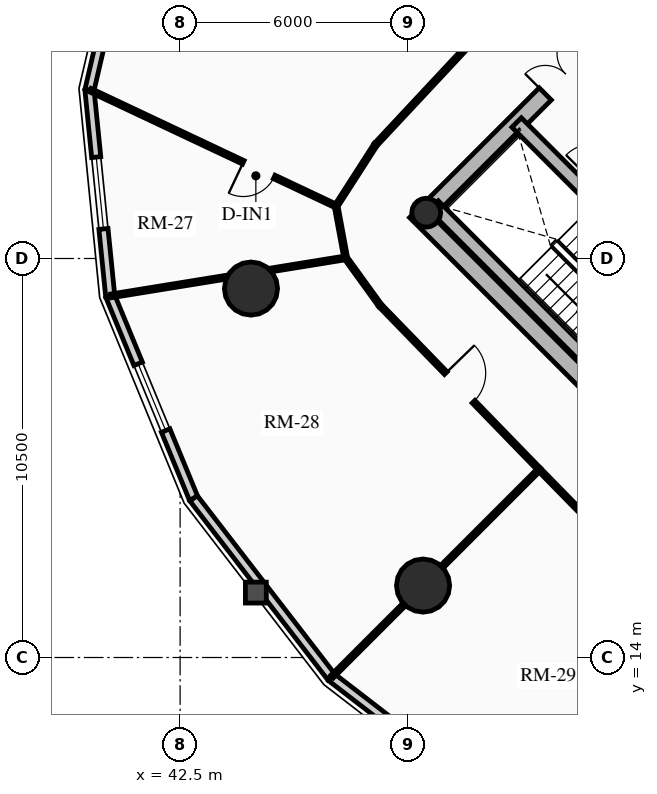
"""IFC4 building model, lengths in metres.
Left out: names, types, materials, properties, quantities, classifications, styles, units other than length and angle.
Written with IfcOpenShell. Run it as: python <this file> out.ifc"""

import sys

from ifc_helpers import new_model, si_unit, direction, frame, frame_2d, origin, origin_2d, place, context, subcontext, project, spatial, rectangle, circle, hollow_circle, extrude, source, transform, mapped, element, fill, save


model = new_model("IFC4")
c1 = context("Model", 3, precision=1e-05, world=origin(), true_north=direction((0.0, 1.0)))
c2 = subcontext(c1, "Body", "Model", "MODEL_VIEW")
j1 = project(units=[si_unit("LENGTHUNIT", "METRE"), si_unit("PLANEANGLEUNIT", "RADIAN")], contexts=[c1])
p1 = place(None, origin())
s1 = spatial("IfcSite", under=j1, at=p1, CompositionType="ELEMENT")
p2 = place(p1, origin())
s2 = spatial("IfcBuilding", under=s1, at=p2, CompositionType="ELEMENT")
p3 = place(p2, frame((0.0, 0.0, 96.34)))
s3 = spatial("IfcBuildingStorey", under=s2, at=p3, CompositionType="ELEMENT", Elevation=96.34)
p4 = place(p3, frame((58.737, 15.697, 0.0), z_axis=(0.0, 0.0, 1.0), x_axis=(-0.707106781187, 0.707106781187, 0.0)))
e1 = element("IfcWall", 1, at=p4, inside=s3, PredefinedType="SHEAR", context=c2, shape_type="SweptSolid", body=[
    extrude(rectangle(XDim=14.2, YDim=0.45, at=frame_2d((7.1, 0.0))), origin(), (0.0, 0.0, 1.0), 2.91),
])
p5 = place(p3, frame((48.856, 25.578, 0.0), z_axis=(0.0, 0.0, 1.0), x_axis=(0.707106781187, 0.707106781187, 0.0)))
e2 = element("IfcWall", 2, at=p5, inside=s3, PredefinedType="SHEAR", context=c2, shape_type="SweptSolid", body=[
    extrude(rectangle(XDim=10.7, YDim=0.45, at=frame_2d((5.35, 0.0))), origin(), (0.0, 0.0, 1.0), 2.91),
])
m1 = source(origin(), c2, "Body", "SweptSolid", [
    extrude(rectangle(XDim=1.5, YDim=2.02, at=frame_2d((0.75, 1.01))), frame((0.0, 0.235, 0.0), z_axis=(0.0, -1.0, 0.0), x_axis=(1.0, 0.0, 0.0)), (0.0, 0.0, 1.0), 0.47),
])
p6 = place(p5, frame((4.6, 0.0, 0.0)))
e3 = element("IfcOpeningElement", 3, at=p6, cuts=e2, PredefinedType="OPENING", context=c2, shape_type="MappedRepresentation", body=[
    mapped(m1, transform((0.0, 0.0, 0.0), x_axis=(1.0, 0.0, 0.0), y_axis=(0.0, 1.0, 0.0), z_axis=(0.0, 0.0, 1.0), scale=1.0)),
])
p7 = place(p3, frame((61.078, 18.355, 0.0), z_axis=(0.0, 0.0, 1.0), x_axis=(-0.707106781187, 0.707106781187, 0.0)))
e4 = element("IfcWall", 4, at=p7, inside=s3, PredefinedType="SHEAR", context=c2, shape_type="SweptSolid", body=[
    extrude(rectangle(XDim=13.75, YDim=0.35, at=frame_2d((6.875, 0.0))), origin(), (0.0, 0.0, 1.0), 2.91),
])
m2 = source(origin(), c2, "Body", "SweptSolid", [
    extrude(rectangle(XDim=1.1, YDim=2.015, at=frame_2d((0.55, 1.007))), frame((0.0, 0.185, 0.0), z_axis=(0.0, -1.0, 0.0), x_axis=(1.0, 0.0, 0.0)), (0.0, 0.0, 1.0), 0.37),
])
p8 = place(p7, frame((4.875, 0.0, 0.0)))
e5 = element("IfcOpeningElement", 5, at=p8, cuts=e4, PredefinedType="OPENING", context=c2, shape_type="MappedRepresentation", body=[
    mapped(m2, transform((0.0, 0.0, 0.0), x_axis=(1.0, 0.0, 0.0), y_axis=(0.0, 1.0, 0.0), z_axis=(0.0, 0.0, 1.0), scale=1.0)),
])
m3 = source(origin(), c2, "Body", "SweptSolid", [
    extrude(rectangle(XDim=1.15, YDim=2.02, at=frame_2d((0.575, 1.01))), frame((0.0, 0.185, 0.0), z_axis=(0.0, -1.0, 0.0), x_axis=(1.0, 0.0, 0.0)), (0.0, 0.0, 1.0), 0.37),
])
p9 = place(p7, frame((7.295, 0.0, 0.0)))
e6 = element("IfcOpeningElement", 6, at=p9, cuts=e4, PredefinedType="OPENING", context=c2, shape_type="MappedRepresentation", body=[
    mapped(m3, transform((0.0, 0.0, 0.0), x_axis=(1.0, 0.0, 0.0), y_axis=(0.0, 1.0, 0.0), z_axis=(0.0, 0.0, 1.0), scale=1.0)),
])
p10 = place(p3, frame((53.922, 21.141, 0.0), z_axis=(0.0, 0.0, 1.0), x_axis=(-0.707088616009, 0.707124945897, 0.0)))
e7 = element("IfcWall", 7, at=p10, inside=s3, PredefinedType="SHEAR", context=c2, shape_type="SweptSolid", body=[
    extrude(rectangle(XDim=6.72, YDim=0.35, at=frame_2d((3.36, 0.0))), origin(), (0.0, 0.0, 1.0), 2.91),
])
p11 = place(p3, frame((48.976, 25.706, 0.0), z_axis=(0.0, 0.0, 1.0), x_axis=(0.707106781187, 0.707106781187, 0.0)))
e8 = element("IfcColumn", 8, at=p11, inside=s3, PredefinedType="COLUMN", context=c2, shape_type="SweptSolid", body=[
    extrude(hollow_circle(Radius=0.38, WallThickness=0.032, at=origin_2d()), origin(), (0.0, 0.0, 1.0), 2.91),
])
for number, where, z_axis, x_axis in (
    (9, (44.365, 23.709, 0.0), (0.0, 0.0, 1.0), (1.0, 0.0, 0.0)),
    (10, (48.893, 15.893, 0.0), (0.0, 0.0, 1.0), (1.0, 0.0, 0.0)),
):
    element("IfcColumn", number, at=place(p3, frame(where, z_axis=z_axis, x_axis=x_axis)), inside=s3, PredefinedType="USERDEFINED", context=c2, shape_type="SweptSolid", body=[
        extrude(circle(Radius=0.7, at=origin_2d()), origin(), (0.0, 0.0, 1.0), 2.91),
    ])
p12 = place(p3, frame((40.115, 28.933, 0.0), z_axis=(0.0, 0.0, 1.0), x_axis=(0.225834725257, 0.974165631126, 0.0)))
e11 = element("IfcWall", 11, at=p12, inside=s3, PredefinedType="SOLIDWALL", context=c2, shape_type="SweptSolid", body=[
    extrude(rectangle(XDim=5.119, YDim=0.24, at=frame_2d((2.56, 0.0))), origin(), (0.0, 0.0, 1.0), 2.179),
])
p13 = place(p3, frame((40.661, 23.513, 0.0), z_axis=(0.0, 0.0, 1.0), x_axis=(-0.10015591906, 0.994971754311, 0.0)))
e12 = element("IfcWall", 12, at=p13, inside=s3, PredefinedType="SOLIDWALL", context=c2, shape_type="SweptSolid", body=[
    extrude(rectangle(XDim=5.448, YDim=0.24, at=frame_2d((2.724, 0.0))), origin(), (0.0, 0.0, 1.0), 2.179),
])
m4 = source(origin(), c2, "Body", "SweptSolid", [
    extrude(rectangle(XDim=1.9, YDim=1.35, at=frame_2d((0.95, 0.675))), frame((0.0, 0.13, 0.0), z_axis=(0.0, -1.0, 0.0), x_axis=(1.0, 0.0, 0.0)), (0.0, 0.0, 1.0), 0.26),
])
p14 = place(p13, frame((1.774, 0.0, 0.65)))
e13 = element("IfcOpeningElement", 13, at=p14, cuts=e12, PredefinedType="OPENING", context=c2, shape_type="MappedRepresentation", body=[
    mapped(m4, transform((0.0, 0.0, 0.0), x_axis=(1.0, 0.0, 0.0), y_axis=(0.0, 1.0, 0.0), z_axis=(0.0, 0.0, 1.0), scale=1.0)),
])
p15 = place(p3, frame((42.855, 18.189, 0.0), z_axis=(0.0, 0.0, 1.0), x_axis=(-0.381027003055, 0.924563909604, 0.0)))
e14 = element("IfcWall", 14, at=p15, inside=s3, PredefinedType="SOLIDWALL", context=c2, shape_type="SweptSolid", body=[
    extrude(rectangle(XDim=5.758, YDim=0.24, at=frame_2d((2.879, 0.0))), origin(), (0.0, 0.0, 1.0), 2.179),
])
p16 = place(p15, frame((1.929, 0.0, 0.65)))
e15 = element("IfcOpeningElement", 15, at=p16, cuts=e14, PredefinedType="OPENING", context=c2, shape_type="MappedRepresentation", body=[
    mapped(m4, transform((0.0, 0.0, 0.0), x_axis=(1.0, 0.0, 0.0), y_axis=(0.0, 1.0, 0.0), z_axis=(0.0, 0.0, 1.0), scale=1.0)),
])
p17 = place(p3, frame((46.483, 13.483, 0.0), z_axis=(0.0, 0.0, 1.0), x_axis=(-0.61054437102, 0.791982052206, 0.0)))
e16 = element("IfcWall", 16, at=p17, inside=s3, PredefinedType="SOLIDWALL", context=c2, shape_type="SweptSolid", body=[
    extrude(rectangle(XDim=5.942, YDim=0.24, at=frame_2d((2.971, 0.0))), origin(), (0.0, 0.0, 1.0), 2.179),
])
p18 = place(p3, frame((51.189, 9.855, 0.0), z_axis=(0.0, 0.0, 1.0), x_axis=(-0.791982052206, 0.61054437102, 0.0)))
e17 = element("IfcWall", 17, at=p18, inside=s3, PredefinedType="SOLIDWALL", context=c2, shape_type="SweptSolid", body=[
    extrude(rectangle(XDim=5.942, YDim=0.24, at=frame_2d((2.971, 0.0))), origin(), (0.0, 0.0, 1.0), 2.179),
])
p19 = place(p18, frame((2.021, 0.0, 0.65)))
e18 = element("IfcOpeningElement", 18, at=p19, cuts=e17, PredefinedType="OPENING", context=c2, shape_type="MappedRepresentation", body=[
    mapped(m4, transform((0.0, 0.0, 0.0), x_axis=(1.0, 0.0, 0.0), y_axis=(0.0, 1.0, 0.0), z_axis=(0.0, 0.0, 1.0), scale=1.0)),
])
p20 = place(p3, frame((52.072, 32.237, 0.0), z_axis=(0.0, 0.0, 1.0), x_axis=(-0.682528774423, -0.730858722383, 0.0)))
e19 = element("IfcWall", 19, at=p20, inside=s3, PredefinedType="MOVABLE", context=c2, shape_type="SweptSolid", body=[
    extrude(rectangle(XDim=6.486, YDim=0.1, at=frame_2d((3.243, 0.0))), origin(), (0.0, 0.0, 1.0), 2.225),
])
p21 = place(p3, frame((47.645, 27.497, 0.0), z_axis=(0.0, 0.0, 1.0), x_axis=(-0.540680612097, -0.841227957038, 0.0)))
e20 = element("IfcWall", 20, at=p21, inside=s3, PredefinedType="MOVABLE", context=c2, shape_type="SweptSolid", body=[
    extrude(rectangle(XDim=1.924, YDim=0.1, at=frame_2d((0.962, 0.0))), origin(), (0.0, 0.0, 1.0), 2.225),
])
p22 = place(p3, frame((46.605, 25.879, 0.0), z_axis=(0.0, 0.0, 1.0), x_axis=(0.182019785456, -0.983294868136, 0.0)))
e21 = element("IfcWall", 21, at=p22, inside=s3, PredefinedType="MOVABLE", context=c2, shape_type="SweptSolid", body=[
    extrude(rectangle(XDim=1.384, YDim=0.1, at=frame_2d((0.692, 0.0))), origin(), (0.0, 0.0, 1.0), 2.225),
])
p23 = place(p3, frame((46.857, 24.518, 0.0), z_axis=(0.0, 0.0, 1.0), x_axis=(0.58624548148, -0.810133467674, 0.0)))
e22 = element("IfcWall", 22, at=p23, inside=s3, PredefinedType="MOVABLE", context=c2, shape_type="SweptSolid", body=[
    extrude(rectangle(XDim=1.546, YDim=0.1, at=frame_2d((0.773, 0.0))), origin(), (0.0, 0.0, 1.0), 2.225),
])
p24 = place(p3, frame((47.763, 23.265, 0.0), z_axis=(0.0, 0.0, 1.0), x_axis=(0.696243493404, -0.717805682544, 0.0)))
e23 = element("IfcWall", 23, at=p24, inside=s3, PredefinedType="MOVABLE", context=c2, shape_type="SweptSolid", body=[
    extrude(rectangle(XDim=6.012, YDim=0.1, at=frame_2d((3.006, 0.0))), origin(), (0.0, 0.0, 1.0), 2.655),
])
m5 = source(origin(), c2, "Body", "SweptSolid", [
    extrude(rectangle(XDim=1.05, YDim=2.015, at=frame_2d((0.525, 1.007))), frame((0.0, 0.06, 0.0), z_axis=(0.0, -1.0, 0.0), x_axis=(1.0, 0.0, 0.0)), (0.0, 0.0, 1.0), 0.12),
])
p25 = place(p24, frame((2.481, 0.0, 0.0)))
e24 = element("IfcOpeningElement", 24, at=p25, cuts=e23, PredefinedType="OPENING", context=c2, shape_type="MappedRepresentation", body=[
    mapped(m5, transform((0.0, 0.0, 0.0), x_axis=(1.0, 0.0, 0.0), y_axis=(0.0, 1.0, 0.0), z_axis=(0.0, 0.0, 1.0), scale=1.0)),
])
p26 = place(p3, frame((51.949, 18.949, 0.0), z_axis=(0.0, 0.0, 1.0), x_axis=(0.699840807936, -0.714298847506, 0.0)))
e25 = element("IfcWall", 25, at=p26, inside=s3, PredefinedType="MOVABLE", context=c2, shape_type="SweptSolid", body=[
    extrude(rectangle(XDim=6.13, YDim=0.1, at=frame_2d((3.065, 0.0))), origin(), (0.0, 0.0, 1.0), 2.225),
])
p27 = place(p3, frame((46.857, 24.518, 0.0), z_axis=(0.0, 0.0, 1.0), x_axis=(-0.987101644997, -0.160094792056, 0.0)))
e26 = element("IfcWall", 26, at=p27, inside=s3, PredefinedType="MOVABLE", context=c2, shape_type="SweptSolid", body=[
    extrude(rectangle(XDim=6.257, YDim=0.1, at=frame_2d((3.128, 0.0))), origin(), (0.0, 0.0, 1.0), 2.179),
])
p28 = place(p3, frame((51.949, 18.949, 0.0), z_axis=(0.0, 0.0, 1.0), x_axis=(-0.707106781187, -0.707106781187, 0.0)))
e27 = element("IfcWall", 27, at=p28, inside=s3, PredefinedType="MOVABLE", context=c2, shape_type="SweptSolid", body=[
    extrude(rectangle(XDim=7.711, YDim=0.1, at=frame_2d((3.855, 0.0))), origin(), (0.0, 0.0, 1.0), 2.179),
])
p29 = place(p3, frame((46.605, 25.879, 0.0), z_axis=(0.0, 0.0, 1.0), x_axis=(-0.904450971726, 0.426577589359, 0.0)))
e28 = element("IfcWall", 28, at=p29, inside=s3, PredefinedType="MOVABLE", context=c2, shape_type="SweptSolid", body=[
    extrude(rectangle(XDim=7.154, YDim=0.1, at=frame_2d((3.577, 0.0))), origin(), (0.0, 0.0, 1.0), 2.179),
])
m6 = source(origin(), c2, "Body", "SweptSolid", [
    extrude(rectangle(XDim=0.9, YDim=2.005, at=frame_2d((0.45, 1.002))), frame((0.0, 0.06, 0.0), z_axis=(0.0, -1.0, 0.0), x_axis=(1.0, 0.0, 0.0)), (0.0, 0.0, 1.0), 0.12),
])
p30 = place(p29, frame((1.8, 0.0, 0.0)))
e29 = element("IfcOpeningElement", 29, at=p30, cuts=e28, PredefinedType="OPENING", context=c2, shape_type="MappedRepresentation", body=[
    mapped(m6, transform((0.0, 0.0, 0.0), x_axis=(1.0, 0.0, 0.0), y_axis=(0.0, 1.0, 0.0), z_axis=(0.0, 0.0, 1.0), scale=1.0)),
])
m7 = source(origin(), c2, "Body", "SweptSolid", [
    extrude(rectangle(XDim=1.9, YDim=1.35, at=frame_2d((0.95, 0.675))), frame((0.0, 0.03, 0.0), z_axis=(0.0, -1.0, 0.0), x_axis=(1.0, 0.0, 0.0)), (0.0, 0.0, 1.0), 0.06),
])
p31 = place(p14, origin())
e30 = element("IfcWindow", 30, at=p31, inside=s3, PartitioningType="DOUBLE_PANEL_VERTICAL", PredefinedType="WINDOW", context=c2, shape_type="MappedRepresentation", body=[
    mapped(m7, transform((0.0, 0.0, 0.0), x_axis=(1.0, 0.0, 0.0), y_axis=(0.0, 1.0, 0.0), z_axis=(0.0, 0.0, 1.0), scale=1.0)),
])
fill(e13, e30)
p32 = place(p16, origin())
e31 = element("IfcWindow", 31, at=p32, inside=s3, PartitioningType="DOUBLE_PANEL_VERTICAL", PredefinedType="WINDOW", context=c2, shape_type="MappedRepresentation", body=[
    mapped(m7, transform((0.0, 0.0, 0.0), x_axis=(1.0, 0.0, 0.0), y_axis=(0.0, 1.0, 0.0), z_axis=(0.0, 0.0, 1.0), scale=1.0)),
])
fill(e15, e31)
m8 = source(origin(), c2, "Body", "SweptSolid", [
    extrude(rectangle(XDim=1.5, YDim=2.02, at=frame_2d((0.75, 1.01))), frame((0.0, 0.025, 0.0), z_axis=(0.0, -1.0, 0.0), x_axis=(1.0, 0.0, 0.0)), (0.0, 0.0, 1.0), 0.05),
])
p33 = place(p6, origin())
e32 = element("IfcDoor", 32, at=p33, inside=s3, OperationType="DOUBLE_DOOR_SINGLE_SWING", PredefinedType="DOOR", context=c2, shape_type="MappedRepresentation", body=[
    mapped(m8, transform((0.0, 0.0, 0.0), x_axis=(1.0, 0.0, 0.0), y_axis=(0.0, 1.0, 0.0), z_axis=(0.0, 0.0, 1.0), scale=1.0)),
])
fill(e3, e32)
m9 = source(origin(), c2, "Body", "SweptSolid", [
    extrude(rectangle(XDim=0.9, YDim=2.005, at=frame_2d((0.45, 1.002))), frame((0.0, 0.025, 0.0), z_axis=(0.0, -1.0, 0.0), x_axis=(1.0, 0.0, 0.0)), (0.0, 0.0, 1.0), 0.05),
])
p34 = place(p30, origin())
e33 = element("IfcDoor", 33, at=p34, inside=s3, OperationType="SINGLE_SWING_RIGHT", PredefinedType="DOOR", context=c2, shape_type="MappedRepresentation", body=[
    mapped(m9, transform((0.0, 0.0, 0.0), x_axis=(1.0, 0.0, 0.0), y_axis=(0.0, 1.0, 0.0), z_axis=(0.0, 0.0, 1.0), scale=1.0)),
])
fill(e29, e33)
m10 = source(origin(), c2, "Body", "SweptSolid", [
    extrude(rectangle(XDim=1.05, YDim=2.015, at=frame_2d((0.525, 1.007))), frame((0.0, 0.025, 0.0), z_axis=(0.0, -1.0, 0.0), x_axis=(1.0, 0.0, 0.0)), (0.0, 0.0, 1.0), 0.05),
])
p35 = place(p25, origin())
e34 = element("IfcDoor", 34, at=p35, inside=s3, OperationType="SINGLE_SWING_LEFT", PredefinedType="DOOR", context=c2, shape_type="MappedRepresentation", body=[
    mapped(m10, transform((0.0, 0.0, 0.0), x_axis=(1.0, 0.0, 0.0), y_axis=(0.0, 1.0, 0.0), z_axis=(0.0, 0.0, 1.0), scale=1.0)),
])
fill(e24, e34)
save(model, sys.argv[1])
